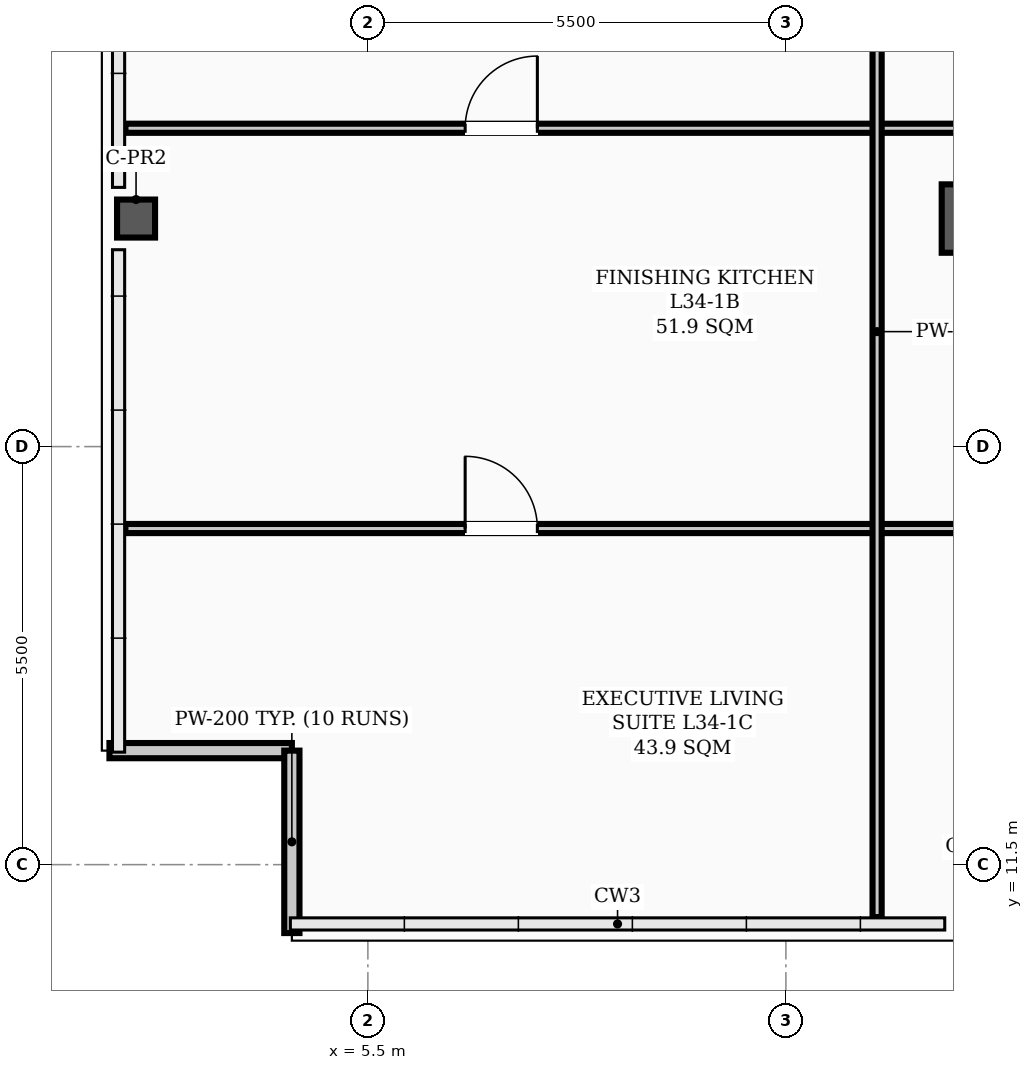
"""IFC4 building model, lengths in metres.
Left out: names, types, materials, properties, quantities, classifications, styles, units other than length and angle.
Written with IfcOpenShell. Run it as: python <this file> out.ifc"""

import sys

from ifc_helpers import new_model, si_unit, direction, frame, frame_2d, origin, origin_2d, place, context, subcontext, project, spatial, rectangle, hollow_rectangle, extrude, element, fill, save


model = new_model("IFC4")
c1 = context("Model", 3, precision=1e-05, world=origin(), true_north=direction((0.0, 1.0)))
c2 = subcontext(c1, "Body", "Model", "MODEL_VIEW")
j1 = project(units=[si_unit("LENGTHUNIT", "METRE"), si_unit("PLANEANGLEUNIT", "RADIAN")], contexts=[c1])
p1 = place(None, origin())
s1 = spatial("IfcSite", under=j1, at=p1, CompositionType="ELEMENT")
p2 = place(p1, origin())
s2 = spatial("IfcBuilding", under=s1, at=p2, CompositionType="ELEMENT")
p3 = place(p2, frame((0.0, 0.0, 138.3)))
s3 = spatial("IfcBuildingStorey", under=s2, at=p3, CompositionType="ELEMENT", Elevation=138.3)
p4 = place(p3, frame((13.5, 20.0, 0.0), z_axis=(0.0, 0.0, 1.0), x_axis=(1.0, 0.0, 0.0)))
e1 = element("IfcColumn", 1, at=p4, inside=s3, PredefinedType="COLUMN", context=c2, shape_type="SweptSolid", body=[
    extrude(hollow_rectangle(XDim=0.9, YDim=0.9, WallThickness=0.035, InnerFilletRadius=0.017, OuterFilletRadius=0.052, at=origin_2d()), origin(), (0.0, 0.0, 1.0), 3.9),
])
p5 = place(p3, frame((2.45, 20.0, 0.0), z_axis=(0.0, 0.0, 1.0), x_axis=(1.0, 0.0, 0.0)))
e2 = element("IfcColumn", 2, at=p5, inside=s3, PredefinedType="COLUMN", context=c2, shape_type="SweptSolid", body=[
    extrude(hollow_rectangle(XDim=0.5, YDim=0.5, WallThickness=0.024, InnerFilletRadius=0.012, OuterFilletRadius=0.036, at=origin_2d()), origin(), (0.0, 0.0, 1.0), 3.9),
])
for number, where, z_axis, x_axis in (
    (3, (2.1, 13.0, 0.0), (0.0, 0.0, 1.0), (1.0, 0.0, 0.0)),
    (4, (4.5, 13.0, 0.0), (0.0, 0.0, 1.0), (0.0, -1.0, 0.0)),
):
    element("IfcWall", number, at=place(p3, frame(where, z_axis=z_axis, x_axis=x_axis)), inside=s3, PredefinedType="PARAPET", context=c2, shape_type="SweptSolid", body=[
        extrude(rectangle(XDim=2.4, YDim=0.2, at=frame_2d((1.2, 0.0))), origin(), (0.0, 0.0, 1.0), 1.2),
    ])
p6 = place(p3, frame((2.31, 21.188, 0.0), z_axis=(0.0, 0.0, 1.0), x_axis=(1.0, 0.0, 0.0)))
e5 = element("IfcWall", 5, at=p6, inside=s3, PredefinedType="PARTITIONING", context=c2, shape_type="SweptSolid", body=[
    extrude(rectangle(XDim=9.89, YDim=0.12, at=frame_2d((4.945, 0.0))), origin(), (0.0, 0.0, 1.0), 2.24),
])
p7 = place(p6, frame((4.47, 0.0, 0.0)))
e6 = element("IfcOpeningElement", 6, at=p7, cuts=e5, PredefinedType="OPENING", context=c2, shape_type="SweptSolid", body=[
    extrude(rectangle(XDim=0.95, YDim=2.08, at=frame_2d((0.475, 1.04))), frame((0.0, 0.07, 0.0), z_axis=(0.0, -1.0, 0.0), x_axis=(1.0, 0.0, 0.0)), (0.0, 0.0, 1.0), 0.14),
])
p8 = place(p3, frame((2.31, 15.922, 0.0), z_axis=(0.0, 0.0, 1.0), x_axis=(1.0, 0.0, 0.0)))
e7 = element("IfcWall", 7, at=p8, inside=s3, PredefinedType="PARTITIONING", context=c2, shape_type="SweptSolid", body=[
    extrude(rectangle(XDim=9.89, YDim=0.12, at=frame_2d((4.945, 0.0))), origin(), (0.0, 0.0, 1.0), 3.66),
])
p9 = place(p8, frame((4.47, 0.0, 0.0)))
e8 = element("IfcOpeningElement", 8, at=p9, cuts=e7, PredefinedType="OPENING", context=c2, shape_type="SweptSolid", body=[
    extrude(rectangle(XDim=0.95, YDim=2.08, at=frame_2d((0.475, 1.04))), frame((0.0, 0.07, 0.0), z_axis=(0.0, -1.0, 0.0), x_axis=(1.0, 0.0, 0.0)), (0.0, 0.0, 1.0), 0.14),
])
p10 = place(p3, frame((12.2, 21.188, 0.0), z_axis=(0.0, 0.0, 1.0), x_axis=(1.0, 0.0, 0.0)))
e9 = element("IfcWall", 9, at=p10, inside=s3, PredefinedType="PARTITIONING", context=c2, shape_type="SweptSolid", body=[
    extrude(rectangle(XDim=6.2, YDim=0.12, at=frame_2d((3.1, 0.0))), origin(), (0.0, 0.0, 1.0), 2.24),
])
p11 = place(p10, frame((2.625, 0.0, 0.0)))
e10 = element("IfcOpeningElement", 10, at=p11, cuts=e9, PredefinedType="OPENING", context=c2, shape_type="SweptSolid", body=[
    extrude(rectangle(XDim=0.95, YDim=2.08, at=frame_2d((0.475, 1.04))), frame((0.0, 0.07, 0.0), z_axis=(0.0, -1.0, 0.0), x_axis=(1.0, 0.0, 0.0)), (0.0, 0.0, 1.0), 0.14),
])
p12 = place(p3, frame((12.2, 15.922, 0.0), z_axis=(0.0, 0.0, 1.0), x_axis=(1.0, 0.0, 0.0)))
e11 = element("IfcWall", 11, at=p12, inside=s3, PredefinedType="PARTITIONING", context=c2, shape_type="SweptSolid", body=[
    extrude(rectangle(XDim=6.2, YDim=0.12, at=frame_2d((3.1, 0.0))), origin(), (0.0, 0.0, 1.0), 2.24),
])
p13 = place(p12, frame((2.625, 0.0, 0.0)))
e12 = element("IfcOpeningElement", 12, at=p13, cuts=e11, PredefinedType="OPENING", context=c2, shape_type="SweptSolid", body=[
    extrude(rectangle(XDim=0.95, YDim=2.08, at=frame_2d((0.475, 1.04))), frame((0.0, 0.07, 0.0), z_axis=(0.0, -1.0, 0.0), x_axis=(1.0, 0.0, 0.0)), (0.0, 0.0, 1.0), 0.14),
])
p14 = place(p3, frame((12.2, 10.81, 0.0), z_axis=(0.0, 0.0, 1.0), x_axis=(0.0, 1.0, 0.0)))
e13 = element("IfcWall", 13, at=p14, inside=s3, PredefinedType="PARTITIONING", context=c2, shape_type="SweptSolid", body=[
    extrude(rectangle(XDim=15.405, YDim=0.12, at=frame_2d((7.703, 0.0))), origin(), (0.0, 0.0, 1.0), 2.24),
])
p15 = place(p14, frame((13.415, 0.0, 0.0)))
e14 = element("IfcOpeningElement", 14, at=p15, cuts=e13, PredefinedType="OPENING", context=c2, shape_type="SweptSolid", body=[
    extrude(rectangle(XDim=0.95, YDim=2.08, at=frame_2d((0.475, 1.04))), frame((0.0, 0.07, 0.0), z_axis=(0.0, -1.0, 0.0), x_axis=(1.0, 0.0, 0.0)), (0.0, 0.0, 1.0), 0.14),
])
p16 = place(p7, origin())
e15 = element("IfcDoor", 15, at=p16, inside=s3, OperationType="SINGLE_SWING_RIGHT", PredefinedType="DOOR", context=c2, shape_type="SweptSolid", body=[
    extrude(rectangle(XDim=0.95, YDim=2.08, at=frame_2d((0.475, 1.04))), frame((0.0, 0.025, 0.0), z_axis=(0.0, -1.0, 0.0), x_axis=(1.0, 0.0, 0.0)), (0.0, 0.0, 1.0), 0.05),
])
fill(e6, e15)
p17 = place(p9, origin())
e16 = element("IfcDoor", 16, at=p17, inside=s3, OperationType="SINGLE_SWING_LEFT", PredefinedType="DOOR", context=c2, shape_type="SweptSolid", body=[
    extrude(rectangle(XDim=0.95, YDim=2.08, at=frame_2d((0.475, 1.04))), frame((0.0, 0.025, 0.0), z_axis=(0.0, -1.0, 0.0), x_axis=(1.0, 0.0, 0.0)), (0.0, 0.0, 1.0), 0.05),
])
fill(e8, e16)
save(model, sys.argv[1])
